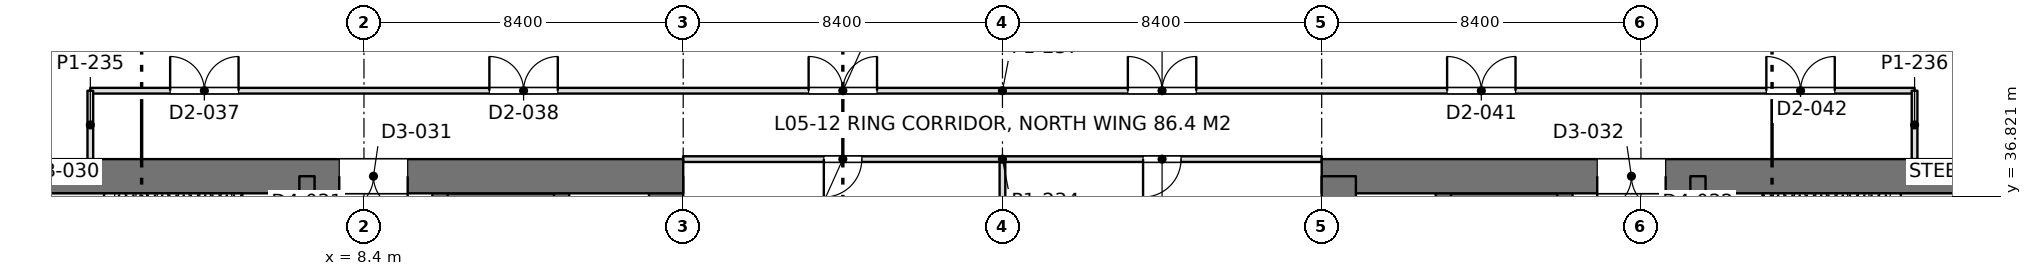
"""IFC4 building model, lengths in metres.
Left out: names, types, materials, properties, quantities, classifications, styles, units other than length and angle.
Written with IfcOpenShell. Run it as: python <this file> out.ifc"""

import sys

from ifc_helpers import new_model, si_unit, direction, frame, frame_2d, origin, place, context, subcontext, project, spatial, rectangle, extrude, element, fill, save


model = new_model("IFC4")
c1 = context("Model", 3, precision=1e-05, world=origin(), true_north=direction((0.0, 1.0)))
c2 = subcontext(c1, "Body", "Model", "MODEL_VIEW")
j1 = project(units=[si_unit("LENGTHUNIT", "METRE"), si_unit("PLANEANGLEUNIT", "RADIAN")], contexts=[c1])
p1 = place(None, origin())
s1 = spatial("IfcSite", under=j1, at=p1, CompositionType="ELEMENT")
p2 = place(p1, origin())
s2 = spatial("IfcBuilding", under=s1, at=p2, CompositionType="ELEMENT")
p3 = place(p2, frame((0.0, 0.0, 23.4)))
s3 = spatial("IfcBuildingStorey", under=s2, at=p3, CompositionType="ELEMENT", Elevation=23.4)
p4 = place(p3, frame((-1.2, 37.35, 0.0), z_axis=(0.0, 0.0, 1.0), x_axis=(1.0, 0.0, 0.0)))
e1 = element("IfcWall", 1, at=p4, inside=s3, PredefinedType="SHEAR", context=c2, shape_type="SweptSolid", body=[
    extrude(rectangle(XDim=18.0, YDim=0.9, at=frame_2d((9.0, 0.0))), origin(), (0.0, 0.0, 1.0), 4.5),
])
p5 = place(p4, frame((8.95, 0.0, 0.0)))
e2 = element("IfcOpeningElement", 2, at=p5, cuts=e1, PredefinedType="OPENING", context=c2, shape_type="SweptSolid", body=[
    extrude(rectangle(XDim=1.8, YDim=2.4, at=frame_2d((0.9, 1.2))), frame((0.0, 0.46, 0.0), z_axis=(0.0, -1.0, 0.0), x_axis=(1.0, 0.0, 0.0)), (0.0, 0.0, 1.0), 0.92),
])
p6 = place(p3, frame((16.35, 13.05, 0.0), z_axis=(0.0, 0.0, 1.0), x_axis=(0.0, 1.0, 0.0)))
e3 = element("IfcWall", 3, at=p6, inside=s3, PredefinedType="SHEAR", context=c2, shape_type="SweptSolid", body=[
    extrude(rectangle(XDim=24.3, YDim=0.9, at=frame_2d((12.15, 0.0))), origin(), (0.0, 0.0, 1.0), 4.5),
])
p7 = place(p3, frame((6.9, 13.05, 0.0), z_axis=(0.0, 0.0, 1.0), x_axis=(0.0, 1.0, 0.0)))
e4 = element("IfcWall", 4, at=p7, inside=s3, PredefinedType="SHEAR", context=c2, shape_type="SweptSolid", body=[
    extrude(rectangle(XDim=24.3, YDim=0.4, at=frame_2d((12.15, 0.0))), origin(), (0.0, 0.0, 1.0), 4.5),
])
p8 = place(p7, frame((1.3, 0.0, 0.0)))
e5 = element("IfcOpeningElement", 5, at=p8, cuts=e4, PredefinedType="OPENING", context=c2, shape_type="SweptSolid", body=[
    extrude(rectangle(XDim=1.0, YDim=2.2, at=frame_2d((0.5, 1.1))), frame((0.0, 0.21, 0.0), z_axis=(0.0, -1.0, 0.0), x_axis=(1.0, 0.0, 0.0)), (0.0, 0.0, 1.0), 0.42),
])
p9 = place(p7, frame((22.0, 0.0, 0.0)))
e6 = element("IfcOpeningElement", 6, at=p9, cuts=e4, PredefinedType="OPENING", context=c2, shape_type="SweptSolid", body=[
    extrude(rectangle(XDim=1.0, YDim=2.2, at=frame_2d((0.5, 1.1))), frame((0.0, 0.21, 0.0), z_axis=(0.0, -1.0, 0.0), x_axis=(1.0, 0.0, 0.0)), (0.0, 0.0, 1.0), 0.42),
])
p10 = place(p7, frame((5.55, 0.0, 0.0)))
e7 = element("IfcOpeningElement", 7, at=p10, cuts=e4, PredefinedType="OPENING", context=c2, shape_type="SweptSolid", body=[
    extrude(rectangle(XDim=1.0, YDim=2.2, at=frame_2d((0.5, 1.1))), frame((0.0, 0.21, 0.0), z_axis=(0.0, -1.0, 0.0), x_axis=(1.0, 0.0, 0.0)), (0.0, 0.0, 1.0), 0.42),
])
p11 = place(p7, frame((9.55, 0.0, 0.0)))
e8 = element("IfcOpeningElement", 8, at=p11, cuts=e4, PredefinedType="OPENING", context=c2, shape_type="SweptSolid", body=[
    extrude(rectangle(XDim=1.0, YDim=2.2, at=frame_2d((0.5, 1.1))), frame((0.0, 0.21, 0.0), z_axis=(0.0, -1.0, 0.0), x_axis=(1.0, 0.0, 0.0)), (0.0, 0.0, 1.0), 0.42),
])
p12 = place(p7, frame((12.8, 0.0, 0.0)))
e9 = element("IfcOpeningElement", 9, at=p12, cuts=e4, PredefinedType="OPENING", context=c2, shape_type="SweptSolid", body=[
    extrude(rectangle(XDim=1.1, YDim=2.2, at=frame_2d((0.55, 1.1))), frame((0.0, 0.21, 0.0), z_axis=(0.0, -1.0, 0.0), x_axis=(1.0, 0.0, 0.0)), (0.0, 0.0, 1.0), 0.42),
])
p13 = place(p7, frame((15.538, 0.0, 0.0)))
e10 = element("IfcOpeningElement", 10, at=p13, cuts=e4, PredefinedType="OPENING", context=c2, shape_type="SweptSolid", body=[
    extrude(rectangle(XDim=1.1, YDim=2.2, at=frame_2d((0.55, 1.1))), frame((0.0, 0.21, 0.0), z_axis=(0.0, -1.0, 0.0), x_axis=(1.0, 0.0, 0.0)), (0.0, 0.0, 1.0), 0.42),
])
p14 = place(p7, frame((18.262, 0.0, 0.0)))
e11 = element("IfcOpeningElement", 11, at=p14, cuts=e4, PredefinedType="OPENING", context=c2, shape_type="SweptSolid", body=[
    extrude(rectangle(XDim=1.1, YDim=2.2, at=frame_2d((0.55, 1.1))), frame((0.0, 0.21, 0.0), z_axis=(0.0, -1.0, 0.0), x_axis=(1.0, 0.0, 0.0)), (0.0, 0.0, 1.0), 0.42),
])
p15 = place(p3, frame((10.4, 13.05, 0.0), z_axis=(0.0, 0.0, 1.0), x_axis=(0.0, 1.0, 0.0)))
e12 = element("IfcWall", 12, at=p15, inside=s3, PredefinedType="SHEAR", context=c2, shape_type="SweptSolid", body=[
    extrude(rectangle(XDim=24.3, YDim=0.4, at=frame_2d((12.15, 0.0))), origin(), (0.0, 0.0, 1.0), 4.5),
])
p16 = place(p15, frame((1.5, 0.0, 0.0)))
e13 = element("IfcOpeningElement", 13, at=p16, cuts=e12, PredefinedType="OPENING", context=c2, shape_type="SweptSolid", body=[
    extrude(rectangle(XDim=1.1, YDim=2.2, at=frame_2d((0.55, 1.1))), frame((0.0, 0.21, 0.0), z_axis=(0.0, -1.0, 0.0), x_axis=(1.0, 0.0, 0.0)), (0.0, 0.0, 1.0), 0.42),
])
p17 = place(p15, frame((4.35, 0.0, 0.0)))
e14 = element("IfcOpeningElement", 14, at=p17, cuts=e12, PredefinedType="OPENING", context=c2, shape_type="SweptSolid", body=[
    extrude(rectangle(XDim=1.1, YDim=2.2, at=frame_2d((0.55, 1.1))), frame((0.0, 0.21, 0.0), z_axis=(0.0, -1.0, 0.0), x_axis=(1.0, 0.0, 0.0)), (0.0, 0.0, 1.0), 0.42),
])
p18 = place(p15, frame((7.2, 0.0, 0.0)))
e15 = element("IfcOpeningElement", 15, at=p18, cuts=e12, PredefinedType="OPENING", context=c2, shape_type="SweptSolid", body=[
    extrude(rectangle(XDim=1.1, YDim=2.2, at=frame_2d((0.55, 1.1))), frame((0.0, 0.21, 0.0), z_axis=(0.0, -1.0, 0.0), x_axis=(1.0, 0.0, 0.0)), (0.0, 0.0, 1.0), 0.42),
])
p19 = place(p15, frame((21.45, 0.0, 0.0)))
e16 = element("IfcOpeningElement", 16, at=p19, cuts=e12, PredefinedType="OPENING", context=c2, shape_type="SweptSolid", body=[
    extrude(rectangle(XDim=1.1, YDim=2.2, at=frame_2d((0.55, 1.1))), frame((0.0, 0.21, 0.0), z_axis=(0.0, -1.0, 0.0), x_axis=(1.0, 0.0, 0.0)), (0.0, 0.0, 1.0), 0.42),
])
p20 = place(p3, frame((13.6, 13.05, 0.0), z_axis=(0.0, 0.0, 1.0), x_axis=(0.0, 1.0, 0.0)))
e17 = element("IfcWall", 17, at=p20, inside=s3, PredefinedType="SHEAR", context=c2, shape_type="SweptSolid", body=[
    extrude(rectangle(XDim=24.3, YDim=0.4, at=frame_2d((12.15, 0.0))), origin(), (0.0, 0.0, 1.0), 4.5),
])
p21 = place(p3, frame((10.4, 36.625, 0.0), z_axis=(0.0, 0.0, 1.0), x_axis=(1.0, 0.0, 0.0)))
e18 = element("IfcWall", 18, at=p21, inside=s3, PredefinedType="SHEAR", context=c2, shape_type="SweptSolid", body=[
    extrude(rectangle(XDim=3.2, YDim=0.55, at=frame_2d((1.6, 0.0))), origin(), (0.0, 0.0, 1.0), 4.5),
])
p22 = place(p3, frame((33.6, 37.35, 0.0), z_axis=(0.0, 0.0, 1.0), x_axis=(1.0, 0.0, 0.0)))
e19 = element("IfcWall", 19, at=p22, inside=s3, PredefinedType="SHEAR", context=c2, shape_type="SweptSolid", body=[
    extrude(rectangle(XDim=18.0, YDim=0.9, at=frame_2d((9.0, 0.0))), origin(), (0.0, 0.0, 1.0), 4.5),
])
p23 = place(p22, frame((7.25, 0.0, 0.0)))
e20 = element("IfcOpeningElement", 20, at=p23, cuts=e19, PredefinedType="OPENING", context=c2, shape_type="SweptSolid", body=[
    extrude(rectangle(XDim=1.8, YDim=2.4, at=frame_2d((0.9, 1.2))), frame((0.0, 0.46, 0.0), z_axis=(0.0, -1.0, 0.0), x_axis=(1.0, 0.0, 0.0)), (0.0, 0.0, 1.0), 0.92),
])
p24 = place(p3, frame((34.05, 13.05, 0.0), z_axis=(0.0, 0.0, 1.0), x_axis=(0.0, 1.0, 0.0)))
e21 = element("IfcWall", 21, at=p24, inside=s3, PredefinedType="SHEAR", context=c2, shape_type="SweptSolid", body=[
    extrude(rectangle(XDim=24.3, YDim=0.9, at=frame_2d((12.15, 0.0))), origin(), (0.0, 0.0, 1.0), 4.5),
])
p25 = place(p3, frame((43.5, 13.05, 0.0), z_axis=(0.0, 0.0, 1.0), x_axis=(0.0, 1.0, 0.0)))
e22 = element("IfcWall", 22, at=p25, inside=s3, PredefinedType="SHEAR", context=c2, shape_type="SweptSolid", body=[
    extrude(rectangle(XDim=24.3, YDim=0.4, at=frame_2d((12.15, 0.0))), origin(), (0.0, 0.0, 1.0), 4.5),
])
p26 = place(p25, frame((1.3, 0.0, 0.0)))
e23 = element("IfcOpeningElement", 23, at=p26, cuts=e22, PredefinedType="OPENING", context=c2, shape_type="SweptSolid", body=[
    extrude(rectangle(XDim=1.0, YDim=2.2, at=frame_2d((0.5, 1.1))), frame((0.0, 0.21, 0.0), z_axis=(0.0, -1.0, 0.0), x_axis=(1.0, 0.0, 0.0)), (0.0, 0.0, 1.0), 0.42),
])
p27 = place(p25, frame((22.0, 0.0, 0.0)))
e24 = element("IfcOpeningElement", 24, at=p27, cuts=e22, PredefinedType="OPENING", context=c2, shape_type="SweptSolid", body=[
    extrude(rectangle(XDim=1.0, YDim=2.2, at=frame_2d((0.5, 1.1))), frame((0.0, 0.21, 0.0), z_axis=(0.0, -1.0, 0.0), x_axis=(1.0, 0.0, 0.0)), (0.0, 0.0, 1.0), 0.42),
])
p28 = place(p25, frame((5.55, 0.0, 0.0)))
e25 = element("IfcOpeningElement", 25, at=p28, cuts=e22, PredefinedType="OPENING", context=c2, shape_type="SweptSolid", body=[
    extrude(rectangle(XDim=1.0, YDim=2.2, at=frame_2d((0.5, 1.1))), frame((0.0, 0.21, 0.0), z_axis=(0.0, -1.0, 0.0), x_axis=(1.0, 0.0, 0.0)), (0.0, 0.0, 1.0), 0.42),
])
p29 = place(p25, frame((9.55, 0.0, 0.0)))
e26 = element("IfcOpeningElement", 26, at=p29, cuts=e22, PredefinedType="OPENING", context=c2, shape_type="SweptSolid", body=[
    extrude(rectangle(XDim=1.0, YDim=2.2, at=frame_2d((0.5, 1.1))), frame((0.0, 0.21, 0.0), z_axis=(0.0, -1.0, 0.0), x_axis=(1.0, 0.0, 0.0)), (0.0, 0.0, 1.0), 0.42),
])
p30 = place(p25, frame((12.8, 0.0, 0.0)))
e27 = element("IfcOpeningElement", 27, at=p30, cuts=e22, PredefinedType="OPENING", context=c2, shape_type="SweptSolid", body=[
    extrude(rectangle(XDim=1.1, YDim=2.2, at=frame_2d((0.55, 1.1))), frame((0.0, 0.21, 0.0), z_axis=(0.0, -1.0, 0.0), x_axis=(1.0, 0.0, 0.0)), (0.0, 0.0, 1.0), 0.42),
])
p31 = place(p25, frame((15.538, 0.0, 0.0)))
e28 = element("IfcOpeningElement", 28, at=p31, cuts=e22, PredefinedType="OPENING", context=c2, shape_type="SweptSolid", body=[
    extrude(rectangle(XDim=1.1, YDim=2.2, at=frame_2d((0.55, 1.1))), frame((0.0, 0.21, 0.0), z_axis=(0.0, -1.0, 0.0), x_axis=(1.0, 0.0, 0.0)), (0.0, 0.0, 1.0), 0.42),
])
p32 = place(p25, frame((18.262, 0.0, 0.0)))
e29 = element("IfcOpeningElement", 29, at=p32, cuts=e22, PredefinedType="OPENING", context=c2, shape_type="SweptSolid", body=[
    extrude(rectangle(XDim=1.1, YDim=2.2, at=frame_2d((0.55, 1.1))), frame((0.0, 0.21, 0.0), z_axis=(0.0, -1.0, 0.0), x_axis=(1.0, 0.0, 0.0)), (0.0, 0.0, 1.0), 0.42),
])
p33 = place(p3, frame((40.0, 13.05, 0.0), z_axis=(0.0, 0.0, 1.0), x_axis=(0.0, 1.0, 0.0)))
e30 = element("IfcWall", 30, at=p33, inside=s3, PredefinedType="SHEAR", context=c2, shape_type="SweptSolid", body=[
    extrude(rectangle(XDim=24.3, YDim=0.4, at=frame_2d((12.15, 0.0))), origin(), (0.0, 0.0, 1.0), 4.5),
])
p34 = place(p33, frame((1.5, 0.0, 0.0)))
e31 = element("IfcOpeningElement", 31, at=p34, cuts=e30, PredefinedType="OPENING", context=c2, shape_type="SweptSolid", body=[
    extrude(rectangle(XDim=1.1, YDim=2.2, at=frame_2d((0.55, 1.1))), frame((0.0, 0.21, 0.0), z_axis=(0.0, -1.0, 0.0), x_axis=(1.0, 0.0, 0.0)), (0.0, 0.0, 1.0), 0.42),
])
p35 = place(p33, frame((4.35, 0.0, 0.0)))
e32 = element("IfcOpeningElement", 32, at=p35, cuts=e30, PredefinedType="OPENING", context=c2, shape_type="SweptSolid", body=[
    extrude(rectangle(XDim=1.1, YDim=2.2, at=frame_2d((0.55, 1.1))), frame((0.0, 0.21, 0.0), z_axis=(0.0, -1.0, 0.0), x_axis=(1.0, 0.0, 0.0)), (0.0, 0.0, 1.0), 0.42),
])
p36 = place(p33, frame((7.2, 0.0, 0.0)))
e33 = element("IfcOpeningElement", 33, at=p36, cuts=e30, PredefinedType="OPENING", context=c2, shape_type="SweptSolid", body=[
    extrude(rectangle(XDim=1.1, YDim=2.2, at=frame_2d((0.55, 1.1))), frame((0.0, 0.21, 0.0), z_axis=(0.0, -1.0, 0.0), x_axis=(1.0, 0.0, 0.0)), (0.0, 0.0, 1.0), 0.42),
])
p37 = place(p33, frame((21.45, 0.0, 0.0)))
e34 = element("IfcOpeningElement", 34, at=p37, cuts=e30, PredefinedType="OPENING", context=c2, shape_type="SweptSolid", body=[
    extrude(rectangle(XDim=1.1, YDim=2.2, at=frame_2d((0.55, 1.1))), frame((0.0, 0.21, 0.0), z_axis=(0.0, -1.0, 0.0), x_axis=(1.0, 0.0, 0.0)), (0.0, 0.0, 1.0), 0.42),
])
p38 = place(p3, frame((36.8, 13.05, 0.0), z_axis=(0.0, 0.0, 1.0), x_axis=(0.0, 1.0, 0.0)))
e35 = element("IfcWall", 35, at=p38, inside=s3, PredefinedType="SHEAR", context=c2, shape_type="SweptSolid", body=[
    extrude(rectangle(XDim=24.3, YDim=0.4, at=frame_2d((12.15, 0.0))), origin(), (0.0, 0.0, 1.0), 4.5),
])
p39 = place(p3, frame((40.0, 36.625, 0.0), z_axis=(0.0, 0.0, 1.0), x_axis=(-1.0, 0.0, 0.0)))
e36 = element("IfcWall", 36, at=p39, inside=s3, PredefinedType="SHEAR", context=c2, shape_type="SweptSolid", body=[
    extrude(rectangle(XDim=3.2, YDim=0.55, at=frame_2d((1.6, 0.0))), origin(), (0.0, 0.0, 1.0), 4.5),
])
p40 = place(p3, frame((1.2, 39.6, 0.0), z_axis=(0.0, 0.0, 1.0), x_axis=(1.0, 0.0, 0.0)))
e37 = element("IfcWall", 37, at=p40, inside=s3, PredefinedType="PARTITIONING", context=c2, shape_type="SweptSolid", body=[
    extrude(rectangle(XDim=48.0, YDim=0.15, at=frame_2d((24.0, 0.0))), origin(), (0.0, 0.0, 1.0), 3.74),
])
p41 = place(p40, frame((2.1, 0.0, 0.0)))
e38 = element("IfcOpeningElement", 38, at=p41, cuts=e37, PredefinedType="OPENING", context=c2, shape_type="SweptSolid", body=[
    extrude(rectangle(XDim=1.8, YDim=2.2, at=frame_2d((0.9, 1.1))), frame((0.0, 0.085, 0.0), z_axis=(0.0, -1.0, 0.0), x_axis=(1.0, 0.0, 0.0)), (0.0, 0.0, 1.0), 0.17),
])
p42 = place(p40, frame((10.5, 0.0, 0.0)))
e39 = element("IfcOpeningElement", 39, at=p42, cuts=e37, PredefinedType="OPENING", context=c2, shape_type="SweptSolid", body=[
    extrude(rectangle(XDim=1.8, YDim=2.2, at=frame_2d((0.9, 1.1))), frame((0.0, 0.085, 0.0), z_axis=(0.0, -1.0, 0.0), x_axis=(1.0, 0.0, 0.0)), (0.0, 0.0, 1.0), 0.17),
])
p43 = place(p40, frame((18.9, 0.0, 0.0)))
e40 = element("IfcOpeningElement", 40, at=p43, cuts=e37, PredefinedType="OPENING", context=c2, shape_type="SweptSolid", body=[
    extrude(rectangle(XDim=1.8, YDim=2.2, at=frame_2d((0.9, 1.1))), frame((0.0, 0.085, 0.0), z_axis=(0.0, -1.0, 0.0), x_axis=(1.0, 0.0, 0.0)), (0.0, 0.0, 1.0), 0.17),
])
p44 = place(p40, frame((27.3, 0.0, 0.0)))
e41 = element("IfcOpeningElement", 41, at=p44, cuts=e37, PredefinedType="OPENING", context=c2, shape_type="SweptSolid", body=[
    extrude(rectangle(XDim=1.8, YDim=2.2, at=frame_2d((0.9, 1.1))), frame((0.0, 0.085, 0.0), z_axis=(0.0, -1.0, 0.0), x_axis=(1.0, 0.0, 0.0)), (0.0, 0.0, 1.0), 0.17),
])
p45 = place(p40, frame((35.7, 0.0, 0.0)))
e42 = element("IfcOpeningElement", 42, at=p45, cuts=e37, PredefinedType="OPENING", context=c2, shape_type="SweptSolid", body=[
    extrude(rectangle(XDim=1.8, YDim=2.2, at=frame_2d((0.9, 1.1))), frame((0.0, 0.085, 0.0), z_axis=(0.0, -1.0, 0.0), x_axis=(1.0, 0.0, 0.0)), (0.0, 0.0, 1.0), 0.17),
])
p46 = place(p40, frame((44.1, 0.0, 0.0)))
e43 = element("IfcOpeningElement", 43, at=p46, cuts=e37, PredefinedType="OPENING", context=c2, shape_type="SweptSolid", body=[
    extrude(rectangle(XDim=1.8, YDim=2.2, at=frame_2d((0.9, 1.1))), frame((0.0, 0.085, 0.0), z_axis=(0.0, -1.0, 0.0), x_axis=(1.0, 0.0, 0.0)), (0.0, 0.0, 1.0), 0.17),
])
for number, where, z_axis, x_axis in (
    (44, (1.2, 37.8, 0.0), (0.0, 0.0, 1.0), (0.0, 1.0, 0.0)),
    (45, (49.2, 37.8, 0.0), (0.0, 0.0, 1.0), (0.0, 1.0, 0.0)),
):
    element("IfcWall", number, at=place(p3, frame(where, z_axis=z_axis, x_axis=x_axis)), inside=s3, PredefinedType="PARTITIONING", context=c2, shape_type="SweptSolid", body=[
        extrude(rectangle(XDim=1.8, YDim=0.15, at=frame_2d((0.9, 0.0))), origin(), (0.0, 0.0, 1.0), 4.34),
    ])
p47 = place(p3, frame((25.2, 34.199, 0.0), z_axis=(0.0, 0.0, 1.0), x_axis=(0.0, 1.0, 0.0)))
e46 = element("IfcWall", 46, at=p47, inside=s3, PredefinedType="PARTITIONING", context=c2, shape_type="SweptSolid", body=[
    extrude(rectangle(XDim=3.527, YDim=0.15, at=frame_2d((1.764, 0.0))), origin(), (0.0, 0.0, 1.0), 3.74),
])
p48 = place(p3, frame((16.798, 37.8, 0.0), z_axis=(0.0, 0.0, 1.0), x_axis=(1.0, 0.0, 0.0)))
e47 = element("IfcWall", 47, at=p48, inside=s3, PredefinedType="PARTITIONING", context=c2, shape_type="SweptSolid", body=[
    extrude(rectangle(XDim=16.804, YDim=0.15, at=frame_2d((8.402, 0.0))), origin(), (0.0, 0.0, 1.0), 3.74),
])
p49 = place(p48, frame((3.702, 0.0, 0.0)))
e48 = element("IfcOpeningElement", 48, at=p49, cuts=e47, PredefinedType="OPENING", context=c2, shape_type="SweptSolid", body=[
    extrude(rectangle(XDim=1.0, YDim=2.2, at=frame_2d((0.5, 1.1))), frame((0.0, 0.085, 0.0), z_axis=(0.0, -1.0, 0.0), x_axis=(1.0, 0.0, 0.0)), (0.0, 0.0, 1.0), 0.17),
])
p50 = place(p48, frame((12.102, 0.0, 0.0)))
e49 = element("IfcOpeningElement", 49, at=p50, cuts=e47, PredefinedType="OPENING", context=c2, shape_type="SweptSolid", body=[
    extrude(rectangle(XDim=1.0, YDim=2.2, at=frame_2d((0.5, 1.1))), frame((0.0, 0.085, 0.0), z_axis=(0.0, -1.0, 0.0), x_axis=(1.0, 0.0, 0.0)), (0.0, 0.0, 1.0), 0.17),
])
p51 = place(p5, frame((1.8, 0.0, 0.0), z_axis=(0.0, 0.0, 1.0), x_axis=(-1.0, 0.0, 0.0)))
e50 = element("IfcDoor", 50, at=p51, inside=s3, OperationType="DOUBLE_DOOR_SINGLE_SWING", PredefinedType="DOOR", context=c2, shape_type="SweptSolid", body=[
    extrude(rectangle(XDim=1.8, YDim=2.4, at=frame_2d((0.9, 1.2))), frame((0.0, 0.025, 0.0), z_axis=(0.0, -1.0, 0.0), x_axis=(1.0, 0.0, 0.0)), (0.0, 0.0, 1.0), 0.05),
])
fill(e2, e50)
p52 = place(p23, frame((1.8, 0.0, 0.0), z_axis=(0.0, 0.0, 1.0), x_axis=(-1.0, 0.0, 0.0)))
e51 = element("IfcDoor", 51, at=p52, inside=s3, OperationType="DOUBLE_DOOR_SINGLE_SWING", PredefinedType="DOOR", context=c2, shape_type="SweptSolid", body=[
    extrude(rectangle(XDim=1.8, YDim=2.4, at=frame_2d((0.9, 1.2))), frame((0.0, 0.025, 0.0), z_axis=(0.0, -1.0, 0.0), x_axis=(1.0, 0.0, 0.0)), (0.0, 0.0, 1.0), 0.05),
])
fill(e20, e51)
p53 = place(p41, origin())
e52 = element("IfcDoor", 52, at=p53, inside=s3, OperationType="DOUBLE_DOOR_SINGLE_SWING", PredefinedType="DOOR", context=c2, shape_type="SweptSolid", body=[
    extrude(rectangle(XDim=1.8, YDim=2.2, at=frame_2d((0.9, 1.1))), frame((0.0, 0.025, 0.0), z_axis=(0.0, -1.0, 0.0), x_axis=(1.0, 0.0, 0.0)), (0.0, 0.0, 1.0), 0.05),
])
fill(e38, e52)
p54 = place(p42, origin())
e53 = element("IfcDoor", 53, at=p54, inside=s3, OperationType="DOUBLE_DOOR_SINGLE_SWING", PredefinedType="DOOR", context=c2, shape_type="SweptSolid", body=[
    extrude(rectangle(XDim=1.8, YDim=2.2, at=frame_2d((0.9, 1.1))), frame((0.0, 0.025, 0.0), z_axis=(0.0, -1.0, 0.0), x_axis=(1.0, 0.0, 0.0)), (0.0, 0.0, 1.0), 0.05),
])
fill(e39, e53)
p55 = place(p43, origin())
e54 = element("IfcDoor", 54, at=p55, inside=s3, OperationType="DOUBLE_DOOR_SINGLE_SWING", PredefinedType="DOOR", context=c2, shape_type="SweptSolid", body=[
    extrude(rectangle(XDim=1.8, YDim=2.2, at=frame_2d((0.9, 1.1))), frame((0.0, 0.025, 0.0), z_axis=(0.0, -1.0, 0.0), x_axis=(1.0, 0.0, 0.0)), (0.0, 0.0, 1.0), 0.05),
])
fill(e40, e54)
p56 = place(p44, origin())
e55 = element("IfcDoor", 55, at=p56, inside=s3, OperationType="DOUBLE_DOOR_SINGLE_SWING", PredefinedType="DOOR", context=c2, shape_type="SweptSolid", body=[
    extrude(rectangle(XDim=1.8, YDim=2.2, at=frame_2d((0.9, 1.1))), frame((0.0, 0.025, 0.0), z_axis=(0.0, -1.0, 0.0), x_axis=(1.0, 0.0, 0.0)), (0.0, 0.0, 1.0), 0.05),
])
fill(e41, e55)
p57 = place(p45, origin())
e56 = element("IfcDoor", 56, at=p57, inside=s3, OperationType="DOUBLE_DOOR_SINGLE_SWING", PredefinedType="DOOR", context=c2, shape_type="SweptSolid", body=[
    extrude(rectangle(XDim=1.8, YDim=2.2, at=frame_2d((0.9, 1.1))), frame((0.0, 0.025, 0.0), z_axis=(0.0, -1.0, 0.0), x_axis=(1.0, 0.0, 0.0)), (0.0, 0.0, 1.0), 0.05),
])
fill(e42, e56)
p58 = place(p46, origin())
e57 = element("IfcDoor", 57, at=p58, inside=s3, OperationType="DOUBLE_DOOR_SINGLE_SWING", PredefinedType="DOOR", context=c2, shape_type="SweptSolid", body=[
    extrude(rectangle(XDim=1.8, YDim=2.2, at=frame_2d((0.9, 1.1))), frame((0.0, 0.025, 0.0), z_axis=(0.0, -1.0, 0.0), x_axis=(1.0, 0.0, 0.0)), (0.0, 0.0, 1.0), 0.05),
])
fill(e43, e57)
p59 = place(p49, frame((1.0, 0.0, 0.0), z_axis=(0.0, 0.0, 1.0), x_axis=(-1.0, 0.0, 0.0)))
e58 = element("IfcDoor", 58, at=p59, inside=s3, OperationType="SINGLE_SWING_RIGHT", PredefinedType="DOOR", context=c2, shape_type="SweptSolid", body=[
    extrude(rectangle(XDim=1.0, YDim=2.2, at=frame_2d((0.5, 1.1))), frame((0.0, 0.025, 0.0), z_axis=(0.0, -1.0, 0.0), x_axis=(1.0, 0.0, 0.0)), (0.0, 0.0, 1.0), 0.05),
])
fill(e48, e58)
p60 = place(p50, frame((1.0, 0.0, 0.0), z_axis=(0.0, 0.0, 1.0), x_axis=(-1.0, 0.0, 0.0)))
e59 = element("IfcDoor", 59, at=p60, inside=s3, OperationType="SINGLE_SWING_RIGHT", PredefinedType="DOOR", context=c2, shape_type="SweptSolid", body=[
    extrude(rectangle(XDim=1.0, YDim=2.2, at=frame_2d((0.5, 1.1))), frame((0.0, 0.025, 0.0), z_axis=(0.0, -1.0, 0.0), x_axis=(1.0, 0.0, 0.0)), (0.0, 0.0, 1.0), 0.05),
])
fill(e49, e59)
save(model, sys.argv[1])
